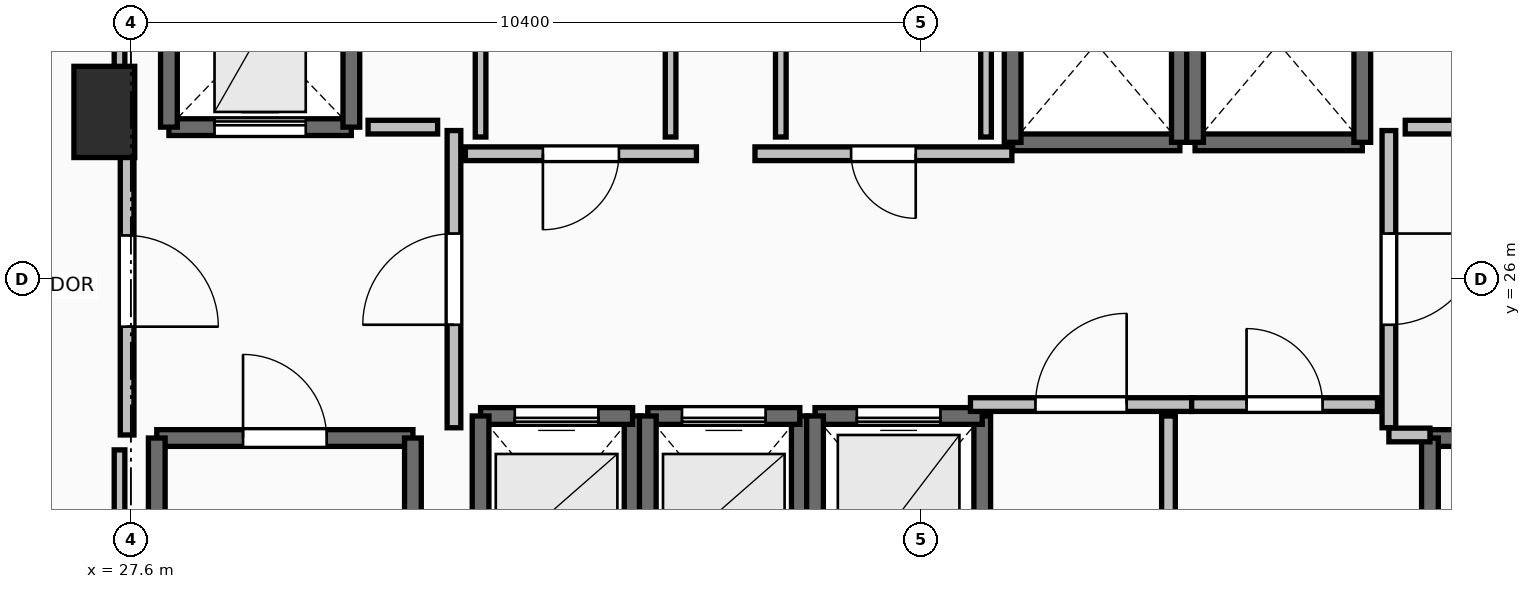
"""IFC4 building model, lengths in metres.
Left out: names, types, materials, properties, quantities, classifications, styles, units other than length and angle.
Written with IfcOpenShell. Run it as: python <this file> out.ifc"""

import sys

from ifc_helpers import new_model, si_unit, direction, frame, frame_2d, origin, origin_2d, place, context, subcontext, project, spatial, rectangle, extrude, element, fill, save


model = new_model("IFC4")
c1 = context("Model", 3, precision=1e-05, world=origin(), true_north=direction((0.0, 1.0)))
c2 = subcontext(c1, "Body", "Model", "MODEL_VIEW")
j1 = project(units=[si_unit("LENGTHUNIT", "METRE"), si_unit("PLANEANGLEUNIT", "RADIAN")], contexts=[c1])
p1 = place(None, origin())
s1 = spatial("IfcSite", under=j1, at=p1, CompositionType="ELEMENT")
p2 = place(p1, origin())
s2 = spatial("IfcBuilding", under=s1, at=p2, CompositionType="ELEMENT")
p3 = place(p2, frame((0.0, 0.0, 160.6)))
s3 = spatial("IfcBuildingStorey", under=s2, at=p3, CompositionType="ELEMENT", Elevation=160.6)
p4 = place(p3, frame((27.25, 28.2, 0.0), z_axis=(0.0, 0.0, 1.0), x_axis=(1.0, 0.0, 0.0)))
e1 = element("IfcColumn", 1, at=p4, inside=s3, PredefinedType="PILASTER", context=c2, shape_type="SweptSolid", body=[
    extrude(rectangle(XDim=0.8, YDim=1.2, at=origin_2d()), origin(), (0.0, 0.0, 1.0), 3.5),
])
p5 = place(p3, frame((27.94, 23.91, 0.0), z_axis=(0.0, 0.0, 1.0), x_axis=(1.0, 0.0, 0.0)))
e2 = element("IfcWall", 2, at=p5, inside=s3, PredefinedType="SOLIDWALL", context=c2, shape_type="SweptSolid", body=[
    extrude(rectangle(XDim=3.37, YDim=0.22, at=frame_2d((1.685, 0.0))), origin(), (0.0, 0.0, 1.0), 3.24),
])
p6 = place(p5, frame((1.135, 0.0, 0.0)))
e3 = element("IfcOpeningElement", 3, at=p6, cuts=e2, PredefinedType="OPENING", context=c2, shape_type="SweptSolid", body=[
    extrude(rectangle(XDim=1.1, YDim=2.15, at=frame_2d((0.55, 1.075))), frame((0.0, 0.125, 0.0), z_axis=(0.0, -1.0, 0.0), x_axis=(1.0, 0.0, 0.0)), (0.0, 0.0, 1.0), 0.25),
])
for number, where, z_axis, x_axis in (
    (4, (31.31, 23.91, 0.0), (0.0, 0.0, 1.0), (0.0, -1.0, 0.0)),
    (5, (27.94, 16.49, 0.0), (0.0, 0.0, 1.0), (0.0, 1.0, 0.0)),
):
    element("IfcWall", number, at=place(p3, frame(where, z_axis=z_axis, x_axis=x_axis)), inside=s3, PredefinedType="SOLIDWALL", context=c2, shape_type="SweptSolid", body=[
        extrude(rectangle(XDim=7.42, YDim=0.22, at=frame_2d((3.71, 0.0))), origin(), (0.0, 0.0, 1.0), 3.24),
    ])
p7 = place(p3, frame((44.69, 23.91, 0.0), z_axis=(0.0, 0.0, 1.0), x_axis=(1.0, 0.0, 0.0)))
e6 = element("IfcWall", 6, at=p7, inside=s3, PredefinedType="SOLIDWALL", context=c2, shape_type="SweptSolid", body=[
    extrude(rectangle(XDim=3.37, YDim=0.22, at=frame_2d((1.685, 0.0))), origin(), (0.0, 0.0, 1.0), 3.24),
])
p8 = place(p7, frame((1.135, 0.0, 0.0)))
e7 = element("IfcOpeningElement", 7, at=p8, cuts=e6, PredefinedType="OPENING", context=c2, shape_type="SweptSolid", body=[
    extrude(rectangle(XDim=1.1, YDim=2.15, at=frame_2d((0.55, 1.075))), frame((0.0, 0.125, 0.0), z_axis=(0.0, -1.0, 0.0), x_axis=(1.0, 0.0, 0.0)), (0.0, 0.0, 1.0), 0.25),
])
p9 = place(p3, frame((44.69, 16.49, 0.0), z_axis=(0.0, 0.0, 1.0), x_axis=(0.0, 1.0, 0.0)))
e8 = element("IfcWall", 8, at=p9, inside=s3, PredefinedType="SOLIDWALL", context=c2, shape_type="SweptSolid", body=[
    extrude(rectangle(XDim=7.42, YDim=0.22, at=frame_2d((3.71, 0.0))), origin(), (0.0, 0.0, 1.0), 3.24),
])
p10 = place(p3, frame((34.2, 21.8, 0.0), z_axis=(0.0, 0.0, 1.0), x_axis=(0.0, 1.0, 0.0)))
e9 = element("IfcWall", 9, at=p10, inside=s3, PredefinedType="SOLIDWALL", context=c2, shape_type="SweptSolid", body=[
    extrude(rectangle(XDim=2.4, YDim=0.22, at=frame_2d((1.2, 0.0))), origin(), (0.0, 0.0, 1.0), 3.24),
])
p11 = place(p3, frame((34.2, 24.2, 0.0), z_axis=(0.0, 0.0, 1.0), x_axis=(-1.0, 0.0, 0.0)))
e10 = element("IfcWall", 10, at=p11, inside=s3, PredefinedType="SOLIDWALL", context=c2, shape_type="SweptSolid", body=[
    extrude(rectangle(XDim=2.0, YDim=0.22, at=frame_2d((1.0, 0.0))), origin(), (0.0, 0.0, 1.0), 3.24),
])
p12 = place(p11, frame((0.45, 0.0, 0.0)))
e11 = element("IfcOpeningElement", 11, at=p12, cuts=e10, PredefinedType="OPENING", context=c2, shape_type="SweptSolid", body=[
    extrude(rectangle(XDim=1.1, YDim=2.2, at=frame_2d((0.55, 1.1))), frame((0.0, 0.125, 0.0), z_axis=(0.0, -1.0, 0.0), x_axis=(1.0, 0.0, 0.0)), (0.0, 0.0, 1.0), 0.25),
])
for number, where, z_axis, x_axis in (
    (12, (32.2, 24.2, 0.0), (0.0, 0.0, 1.0), (0.0, -1.0, 0.0)),
    (13, (36.4, 21.8, 0.0), (0.0, 0.0, 1.0), (0.0, 1.0, 0.0)),
):
    element("IfcWall", number, at=place(p3, frame(where, z_axis=z_axis, x_axis=x_axis)), inside=s3, PredefinedType="SOLIDWALL", context=c2, shape_type="SweptSolid", body=[
        extrude(rectangle(XDim=2.4, YDim=0.22, at=frame_2d((1.2, 0.0))), origin(), (0.0, 0.0, 1.0), 3.24),
    ])
p13 = place(p3, frame((36.4, 24.2, 0.0), z_axis=(0.0, 0.0, 1.0), x_axis=(-1.0, 0.0, 0.0)))
e14 = element("IfcWall", 14, at=p13, inside=s3, PredefinedType="SOLIDWALL", context=c2, shape_type="SweptSolid", body=[
    extrude(rectangle(XDim=2.0, YDim=0.22, at=frame_2d((1.0, 0.0))), origin(), (0.0, 0.0, 1.0), 3.24),
])
p14 = place(p13, frame((0.45, 0.0, 0.0)))
e15 = element("IfcOpeningElement", 15, at=p14, cuts=e14, PredefinedType="OPENING", context=c2, shape_type="SweptSolid", body=[
    extrude(rectangle(XDim=1.1, YDim=2.2, at=frame_2d((0.55, 1.1))), frame((0.0, 0.125, 0.0), z_axis=(0.0, -1.0, 0.0), x_axis=(1.0, 0.0, 0.0)), (0.0, 0.0, 1.0), 0.25),
])
p15 = place(p3, frame((34.4, 24.2, 0.0), z_axis=(0.0, 0.0, 1.0), x_axis=(0.0, -1.0, 0.0)))
e16 = element("IfcWall", 16, at=p15, inside=s3, PredefinedType="SOLIDWALL", context=c2, shape_type="SweptSolid", body=[
    extrude(rectangle(XDim=2.4, YDim=0.22, at=frame_2d((1.2, 0.0))), origin(), (0.0, 0.0, 1.0), 3.24),
])
p16 = place(p3, frame((38.8, 21.6, 0.0), z_axis=(0.0, 0.0, 1.0), x_axis=(0.0, 1.0, 0.0)))
e17 = element("IfcWall", 17, at=p16, inside=s3, PredefinedType="SOLIDWALL", context=c2, shape_type="SweptSolid", body=[
    extrude(rectangle(XDim=2.6, YDim=0.22, at=frame_2d((1.3, 0.0))), origin(), (0.0, 0.0, 1.0), 3.24),
])
p17 = place(p3, frame((38.8, 24.2, 0.0), z_axis=(0.0, 0.0, 1.0), x_axis=(-1.0, 0.0, 0.0)))
e18 = element("IfcWall", 18, at=p17, inside=s3, PredefinedType="SOLIDWALL", context=c2, shape_type="SweptSolid", body=[
    extrude(rectangle(XDim=2.2, YDim=0.22, at=frame_2d((1.1, 0.0))), origin(), (0.0, 0.0, 1.0), 3.24),
])
p18 = place(p17, frame((0.55, 0.0, 0.0)))
e19 = element("IfcOpeningElement", 19, at=p18, cuts=e18, PredefinedType="OPENING", context=c2, shape_type="SweptSolid", body=[
    extrude(rectangle(XDim=1.1, YDim=2.2, at=frame_2d((0.55, 1.1))), frame((0.0, 0.125, 0.0), z_axis=(0.0, -1.0, 0.0), x_axis=(1.0, 0.0, 0.0)), (0.0, 0.0, 1.0), 0.25),
])
p19 = place(p3, frame((36.6, 24.2, 0.0), z_axis=(0.0, 0.0, 1.0), x_axis=(0.0, -1.0, 0.0)))
e20 = element("IfcWall", 20, at=p19, inside=s3, PredefinedType="SOLIDWALL", context=c2, shape_type="SweptSolid", body=[
    extrude(rectangle(XDim=2.6, YDim=0.22, at=frame_2d((1.3, 0.0))), origin(), (0.0, 0.0, 1.0), 3.24),
])
p20 = place(p3, frame((39.2, 27.8, 0.0), z_axis=(0.0, 0.0, 1.0), x_axis=(1.0, 0.0, 0.0)))
e21 = element("IfcWall", 21, at=p20, inside=s3, PredefinedType="SOLIDWALL", context=c2, shape_type="SweptSolid", body=[
    extrude(rectangle(XDim=2.2, YDim=0.22, at=frame_2d((1.1, 0.0))), origin(), (0.0, 0.0, 1.0), 3.24),
])
for number, where, z_axis, x_axis in (
    (22, (41.4, 27.8, 0.0), (0.0, 0.0, 1.0), (0.0, 1.0, 0.0)),
    (23, (39.2, 30.4, 0.0), (0.0, 0.0, 1.0), (0.0, -1.0, 0.0)),
):
    element("IfcWall", number, at=place(p3, frame(where, z_axis=z_axis, x_axis=x_axis)), inside=s3, PredefinedType="SOLIDWALL", context=c2, shape_type="SweptSolid", body=[
        extrude(rectangle(XDim=2.6, YDim=0.22, at=frame_2d((1.3, 0.0))), origin(), (0.0, 0.0, 1.0), 3.24),
    ])
p21 = place(p3, frame((41.6, 27.8, 0.0), z_axis=(0.0, 0.0, 1.0), x_axis=(1.0, 0.0, 0.0)))
e24 = element("IfcWall", 24, at=p21, inside=s3, PredefinedType="SOLIDWALL", context=c2, shape_type="SweptSolid", body=[
    extrude(rectangle(XDim=2.2, YDim=0.22, at=frame_2d((1.1, 0.0))), origin(), (0.0, 0.0, 1.0), 3.24),
])
for number, where, z_axis, x_axis in (
    (25, (43.8, 27.8, 0.0), (0.0, 0.0, 1.0), (0.0, 1.0, 0.0)),
    (26, (41.6, 30.4, 0.0), (0.0, 0.0, 1.0), (0.0, -1.0, 0.0)),
):
    element("IfcWall", number, at=place(p3, frame(where, z_axis=z_axis, x_axis=x_axis)), inside=s3, PredefinedType="SOLIDWALL", context=c2, shape_type="SweptSolid", body=[
        extrude(rectangle(XDim=2.6, YDim=0.22, at=frame_2d((1.3, 0.0))), origin(), (0.0, 0.0, 1.0), 3.24),
    ])
p22 = place(p3, frame((28.1, 28.0, 0.0), z_axis=(0.0, 0.0, 1.0), x_axis=(1.0, 0.0, 0.0)))
e27 = element("IfcWall", 27, at=p22, inside=s3, PredefinedType="SHEAR", context=c2, shape_type="SweptSolid", body=[
    extrude(rectangle(XDim=2.4, YDim=0.22, at=frame_2d((1.2, 0.0))), origin(), (0.0, 0.0, 1.0), 3.24),
])
p23 = place(p22, frame((0.6, 0.0, 0.0)))
e28 = element("IfcOpeningElement", 28, at=p23, cuts=e27, PredefinedType="OPENING", context=c2, shape_type="SweptSolid", body=[
    extrude(rectangle(XDim=1.2, YDim=2.2, at=frame_2d((0.6, 1.1))), frame((0.0, 0.125, 0.0), z_axis=(0.0, -1.0, 0.0), x_axis=(1.0, 0.0, 0.0)), (0.0, 0.0, 1.0), 0.25),
])
for number, where, z_axis, x_axis in (
    (29, (30.5, 28.0, 0.0), (0.0, 0.0, 1.0), (0.0, 1.0, 0.0)),
    (30, (28.1, 30.5, 0.0), (0.0, 0.0, 1.0), (0.0, -1.0, 0.0)),
):
    element("IfcWall", number, at=place(p3, frame(where, z_axis=z_axis, x_axis=x_axis)), inside=s3, PredefinedType="SHEAR", context=c2, shape_type="SweptSolid", body=[
        extrude(rectangle(XDim=2.5, YDim=0.22, at=frame_2d((1.25, 0.0))), origin(), (0.0, 0.0, 1.0), 3.24),
    ])
p24 = place(p3, frame((31.85, 24.045, 0.0), z_axis=(0.0, 0.0, 1.0), x_axis=(0.0, 1.0, 0.0)))
e31 = element("IfcWall", 31, at=p24, inside=s3, PredefinedType="PARTITIONING", context=c2, shape_type="SweptSolid", body=[
    extrude(rectangle(XDim=3.91, YDim=0.18, at=frame_2d((1.955, 0.0))), origin(), (0.0, 0.0, 1.0), 3.24),
])
p25 = place(p24, frame((1.355, 0.0, 0.0)))
e32 = element("IfcOpeningElement", 32, at=p25, cuts=e31, PredefinedType="OPENING", context=c2, shape_type="SweptSolid", body=[
    extrude(rectangle(XDim=1.2, YDim=2.15, at=frame_2d((0.6, 1.075))), frame((0.0, 0.105, 0.0), z_axis=(0.0, -1.0, 0.0), x_axis=(1.0, 0.0, 0.0)), (0.0, 0.0, 1.0), 0.21),
])
p26 = place(p3, frame((27.55, 28.0, 0.0), z_axis=(0.0, 0.0, 1.0), x_axis=(0.0, -1.0, 0.0)))
e33 = element("IfcWall", 33, at=p26, inside=s3, PredefinedType="PARTITIONING", context=c2, shape_type="SweptSolid", body=[
    extrude(rectangle(XDim=4.05, YDim=0.18, at=frame_2d((2.025, 0.0))), origin(), (0.0, 0.0, 1.0), 3.24),
])
p27 = place(p26, frame((1.425, 0.0, 0.0)))
e34 = element("IfcOpeningElement", 34, at=p27, cuts=e33, PredefinedType="OPENING", context=c2, shape_type="SweptSolid", body=[
    extrude(rectangle(XDim=1.2, YDim=2.15, at=frame_2d((0.6, 1.075))), frame((0.0, 0.105, 0.0), z_axis=(0.0, -1.0, 0.0), x_axis=(1.0, 0.0, 0.0)), (0.0, 0.0, 1.0), 0.21),
])
p28 = place(p3, frame((44.15, 27.955, 0.0), z_axis=(0.0, 0.0, 1.0), x_axis=(0.0, -1.0, 0.0)))
e35 = element("IfcWall", 35, at=p28, inside=s3, PredefinedType="PARTITIONING", context=c2, shape_type="SweptSolid", body=[
    extrude(rectangle(XDim=3.91, YDim=0.18, at=frame_2d((1.955, 0.0))), origin(), (0.0, 0.0, 1.0), 3.24),
])
p29 = place(p28, frame((1.355, 0.0, 0.0)))
e36 = element("IfcOpeningElement", 36, at=p29, cuts=e35, PredefinedType="OPENING", context=c2, shape_type="SweptSolid", body=[
    extrude(rectangle(XDim=1.2, YDim=2.15, at=frame_2d((0.6, 1.075))), frame((0.0, 0.105, 0.0), z_axis=(0.0, -1.0, 0.0), x_axis=(1.0, 0.0, 0.0)), (0.0, 0.0, 1.0), 0.21),
])
p30 = place(p3, frame((44.15, 23.95, 0.0), z_axis=(0.0, 0.0, 1.0), x_axis=(1.0, 0.0, 0.0)))
e37 = element("IfcWall", 37, at=p30, inside=s3, PredefinedType="PARTITIONING", context=c2, shape_type="SweptSolid", body=[
    extrude(rectangle(XDim=0.54, YDim=0.18, at=frame_2d((0.27, 0.0))), origin(), (0.0, 0.0, 1.0), 3.24),
])
p31 = place(p3, frame((38.645, 24.35, 0.0), z_axis=(0.0, 0.0, 1.0), x_axis=(1.0, 0.0, 0.0)))
e38 = element("IfcWall", 38, at=p31, inside=s3, PredefinedType="PARTITIONING", context=c2, shape_type="SweptSolid", body=[
    extrude(rectangle(XDim=2.91, YDim=0.18, at=frame_2d((1.455, 0.0))), origin(), (0.0, 0.0, 1.0), 3.24),
])
p32 = place(p31, frame((0.855, 0.0, 0.0)))
e39 = element("IfcOpeningElement", 39, at=p32, cuts=e38, PredefinedType="OPENING", context=c2, shape_type="SweptSolid", body=[
    extrude(rectangle(XDim=1.2, YDim=2.15, at=frame_2d((0.6, 1.075))), frame((0.0, 0.105, 0.0), z_axis=(0.0, -1.0, 0.0), x_axis=(1.0, 0.0, 0.0)), (0.0, 0.0, 1.0), 0.21),
])
p33 = place(p3, frame((41.555, 24.35, 0.0), z_axis=(0.0, 0.0, 1.0), x_axis=(1.0, 0.0, 0.0)))
e40 = element("IfcWall", 40, at=p33, inside=s3, PredefinedType="PARTITIONING", context=c2, shape_type="SweptSolid", body=[
    extrude(rectangle(XDim=2.445, YDim=0.18, at=frame_2d((1.223, 0.0))), origin(), (0.0, 0.0, 1.0), 3.24),
])
p34 = place(p33, frame((0.722, 0.0, 0.0)))
e41 = element("IfcOpeningElement", 41, at=p34, cuts=e40, PredefinedType="OPENING", context=c2, shape_type="SweptSolid", body=[
    extrude(rectangle(XDim=1.0, YDim=2.15, at=frame_2d((0.5, 1.075))), frame((0.0, 0.105, 0.0), z_axis=(0.0, -1.0, 0.0), x_axis=(1.0, 0.0, 0.0)), (0.0, 0.0, 1.0), 0.21),
])
p35 = place(p3, frame((35.04, 27.65, 0.0), z_axis=(0.0, 0.0, 1.0), x_axis=(-1.0, 0.0, 0.0)))
e42 = element("IfcWall", 42, at=p35, inside=s3, PredefinedType="PARTITIONING", context=c2, shape_type="SweptSolid", body=[
    extrude(rectangle(XDim=3.04, YDim=0.18, at=frame_2d((1.52, 0.0))), origin(), (0.0, 0.0, 1.0), 3.24),
])
p36 = place(p35, frame((1.02, 0.0, 0.0)))
e43 = element("IfcOpeningElement", 43, at=p36, cuts=e42, PredefinedType="OPENING", context=c2, shape_type="SweptSolid", body=[
    extrude(rectangle(XDim=1.0, YDim=2.15, at=frame_2d((0.5, 1.075))), frame((0.0, 0.105, 0.0), z_axis=(0.0, -1.0, 0.0), x_axis=(1.0, 0.0, 0.0)), (0.0, 0.0, 1.0), 0.21),
])
p37 = place(p3, frame((39.19, 27.65, 0.0), z_axis=(0.0, 0.0, 1.0), x_axis=(-1.0, 0.0, 0.0)))
e44 = element("IfcWall", 44, at=p37, inside=s3, PredefinedType="PARTITIONING", context=c2, shape_type="SweptSolid", body=[
    extrude(rectangle(XDim=3.38, YDim=0.18, at=frame_2d((1.69, 0.0))), origin(), (0.0, 0.0, 1.0), 3.24),
])
p38 = place(p37, frame((1.265, 0.0, 0.0)))
e45 = element("IfcOpeningElement", 45, at=p38, cuts=e44, PredefinedType="OPENING", context=c2, shape_type="SweptSolid", body=[
    extrude(rectangle(XDim=0.85, YDim=2.1, at=frame_2d((0.425, 1.05))), frame((0.0, 0.105, 0.0), z_axis=(0.0, -1.0, 0.0), x_axis=(1.0, 0.0, 0.0)), (0.0, 0.0, 1.0), 0.21),
])
p39 = place(p3, frame((41.25, 20.305, 0.0), z_axis=(0.0, 0.0, 1.0), x_axis=(0.0, 1.0, 0.0)))
e46 = element("IfcWall", 46, at=p39, inside=s3, PredefinedType="PARTITIONING", context=c2, shape_type="SweptSolid", body=[
    extrude(rectangle(XDim=3.895, YDim=0.18, at=frame_2d((1.948, 0.0))), origin(), (0.0, 0.0, 1.0), 3.24),
])
p40 = place(p39, frame((1.448, 0.0, 0.0)))
e47 = element("IfcOpeningElement", 47, at=p40, cuts=e46, PredefinedType="OPENING", context=c2, shape_type="SweptSolid", body=[
    extrude(rectangle(XDim=1.0, YDim=2.15, at=frame_2d((0.5, 1.075))), frame((0.0, 0.105, 0.0), z_axis=(0.0, -1.0, 0.0), x_axis=(1.0, 0.0, 0.0)), (0.0, 0.0, 1.0), 0.21),
])
for number, where, z_axis, x_axis in (
    (48, (31.635, 28.0, 0.0), (0.0, 0.0, 1.0), (-1.0, 0.0, 0.0)),
    (49, (45.28, 28.0, 0.0), (0.0, 0.0, 1.0), (-1.0, 0.0, 0.0)),
):
    element("IfcWall", number, at=place(p3, frame(where, z_axis=z_axis, x_axis=x_axis)), inside=s3, PredefinedType="PARTITIONING", context=c2, shape_type="SweptSolid", body=[
        extrude(rectangle(XDim=0.915, YDim=0.18, at=frame_2d((0.458, 0.0))), origin(), (0.0, 0.0, 1.0), 3.24),
    ])
for number, where, z_axis, x_axis in (
    (50, (32.2, 30.26, 0.0), (0.0, 0.0, 1.0), (0.0, -1.0, 0.0)),
    (51, (34.7, 27.87, 0.0), (0.0, 0.0, 1.0), (0.0, 1.0, 0.0)),
    (52, (36.15, 30.26, 0.0), (0.0, 0.0, 1.0), (0.0, -1.0, 0.0)),
    (53, (38.85, 27.87, 0.0), (0.0, 0.0, 1.0), (0.0, 1.0, 0.0)),
):
    element("IfcWall", number, at=place(p3, frame(where, z_axis=z_axis, x_axis=x_axis)), inside=s3, PredefinedType="PARTITIONING", context=c2, shape_type="SweptSolid", body=[
        extrude(rectangle(XDim=2.39, YDim=0.14, at=frame_2d((1.195, 0.0))), origin(), (0.0, 0.0, 1.0), 3.24),
    ])
p41 = place(p3, frame((27.45, 33.45, 0.0), z_axis=(0.0, 0.0, 1.0), x_axis=(0.0, -1.0, 0.0)))
e54 = element("IfcWall", 54, at=p41, inside=s3, PredefinedType="PARTITIONING", context=c2, shape_type="SweptSolid", body=[
    extrude(rectangle(XDim=5.254, YDim=0.14, at=frame_2d((2.627, 0.0))), origin(), (0.0, 0.0, 1.0), 2.432),
])
p42 = place(p3, frame((27.45, 23.754, 0.0), z_axis=(0.0, 0.0, 1.0), x_axis=(0.0, -1.0, 0.0)))
e55 = element("IfcWall", 55, at=p42, inside=s3, PredefinedType="PARTITIONING", context=c2, shape_type="SweptSolid", body=[
    extrude(rectangle(XDim=7.514, YDim=0.14, at=frame_2d((3.757, 0.0))), origin(), (0.0, 0.0, 1.0), 2.432),
])
p43 = place(p6, origin())
e56 = element("IfcDoor", 56, at=p43, inside=s3, OperationType="SINGLE_SWING_LEFT", PredefinedType="DOOR", context=c2, shape_type="SweptSolid", body=[
    extrude(rectangle(XDim=1.1, YDim=2.15, at=frame_2d((0.55, 1.075))), frame((0.0, 0.025, 0.0), z_axis=(0.0, -1.0, 0.0), x_axis=(1.0, 0.0, 0.0)), (0.0, 0.0, 1.0), 0.05),
])
fill(e3, e56)
p44 = place(p12, origin())
e57 = element("IfcDoor", 57, at=p44, inside=s3, OperationType="SLIDING_TO_LEFT", PredefinedType="DOOR", context=c2, shape_type="SweptSolid", body=[
    extrude(rectangle(XDim=1.1, YDim=2.2, at=frame_2d((0.55, 1.1))), frame((0.0, 0.025, 0.0), z_axis=(0.0, -1.0, 0.0), x_axis=(1.0, 0.0, 0.0)), (0.0, 0.0, 1.0), 0.05),
])
fill(e11, e57)
p45 = place(p14, origin())
e58 = element("IfcDoor", 58, at=p45, inside=s3, OperationType="SLIDING_TO_LEFT", PredefinedType="DOOR", context=c2, shape_type="SweptSolid", body=[
    extrude(rectangle(XDim=1.1, YDim=2.2, at=frame_2d((0.55, 1.1))), frame((0.0, 0.025, 0.0), z_axis=(0.0, -1.0, 0.0), x_axis=(1.0, 0.0, 0.0)), (0.0, 0.0, 1.0), 0.05),
])
fill(e15, e58)
p46 = place(p18, origin())
e59 = element("IfcDoor", 59, at=p46, inside=s3, OperationType="SLIDING_TO_LEFT", PredefinedType="DOOR", context=c2, shape_type="SweptSolid", body=[
    extrude(rectangle(XDim=1.1, YDim=2.2, at=frame_2d((0.55, 1.1))), frame((0.0, 0.025, 0.0), z_axis=(0.0, -1.0, 0.0), x_axis=(1.0, 0.0, 0.0)), (0.0, 0.0, 1.0), 0.05),
])
fill(e19, e59)
p47 = place(p23, origin())
e60 = element("IfcDoor", 60, at=p47, inside=s3, OperationType="SLIDING_TO_LEFT", PredefinedType="DOOR", context=c2, shape_type="SweptSolid", body=[
    extrude(rectangle(XDim=1.2, YDim=2.2, at=frame_2d((0.6, 1.1))), frame((0.0, 0.025, 0.0), z_axis=(0.0, -1.0, 0.0), x_axis=(1.0, 0.0, 0.0)), (0.0, 0.0, 1.0), 0.05),
])
fill(e28, e60)
p48 = place(p25, origin())
e61 = element("IfcDoor", 61, at=p48, inside=s3, OperationType="SINGLE_SWING_LEFT", PredefinedType="DOOR", context=c2, shape_type="SweptSolid", body=[
    extrude(rectangle(XDim=1.2, YDim=2.15, at=frame_2d((0.6, 1.075))), frame((0.0, 0.025, 0.0), z_axis=(0.0, -1.0, 0.0), x_axis=(1.0, 0.0, 0.0)), (0.0, 0.0, 1.0), 0.05),
])
fill(e32, e61)
p49 = place(p27, origin())
e62 = element("IfcDoor", 62, at=p49, inside=s3, OperationType="SINGLE_SWING_RIGHT", PredefinedType="DOOR", context=c2, shape_type="SweptSolid", body=[
    extrude(rectangle(XDim=1.2, YDim=2.15, at=frame_2d((0.6, 1.075))), frame((0.0, 0.025, 0.0), z_axis=(0.0, -1.0, 0.0), x_axis=(1.0, 0.0, 0.0)), (0.0, 0.0, 1.0), 0.05),
])
fill(e34, e62)
p50 = place(p29, origin())
e63 = element("IfcDoor", 63, at=p50, inside=s3, OperationType="SINGLE_SWING_LEFT", PredefinedType="DOOR", context=c2, shape_type="SweptSolid", body=[
    extrude(rectangle(XDim=1.2, YDim=2.15, at=frame_2d((0.6, 1.075))), frame((0.0, 0.025, 0.0), z_axis=(0.0, -1.0, 0.0), x_axis=(1.0, 0.0, 0.0)), (0.0, 0.0, 1.0), 0.05),
])
fill(e36, e63)
p51 = place(p32, origin())
e64 = element("IfcDoor", 64, at=p51, inside=s3, OperationType="SINGLE_SWING_RIGHT", PredefinedType="DOOR", context=c2, shape_type="SweptSolid", body=[
    extrude(rectangle(XDim=1.2, YDim=2.15, at=frame_2d((0.6, 1.075))), frame((0.0, 0.025, 0.0), z_axis=(0.0, -1.0, 0.0), x_axis=(1.0, 0.0, 0.0)), (0.0, 0.0, 1.0), 0.05),
])
fill(e39, e64)
p52 = place(p34, origin())
e65 = element("IfcDoor", 65, at=p52, inside=s3, OperationType="SINGLE_SWING_LEFT", PredefinedType="DOOR", context=c2, shape_type="SweptSolid", body=[
    extrude(rectangle(XDim=1.0, YDim=2.15, at=frame_2d((0.5, 1.075))), frame((0.0, 0.025, 0.0), z_axis=(0.0, -1.0, 0.0), x_axis=(1.0, 0.0, 0.0)), (0.0, 0.0, 1.0), 0.05),
])
fill(e41, e65)
p53 = place(p36, origin())
e66 = element("IfcDoor", 66, at=p53, inside=s3, OperationType="SINGLE_SWING_RIGHT", PredefinedType="DOOR", context=c2, shape_type="SweptSolid", body=[
    extrude(rectangle(XDim=1.0, YDim=2.15, at=frame_2d((0.5, 1.075))), frame((0.0, 0.025, 0.0), z_axis=(0.0, -1.0, 0.0), x_axis=(1.0, 0.0, 0.0)), (0.0, 0.0, 1.0), 0.05),
])
fill(e43, e66)
p54 = place(p38, origin())
e67 = element("IfcDoor", 67, at=p54, inside=s3, OperationType="SINGLE_SWING_LEFT", PredefinedType="DOOR", context=c2, shape_type="SweptSolid", body=[
    extrude(rectangle(XDim=0.85, YDim=2.1, at=frame_2d((0.425, 1.05))), frame((0.0, 0.025, 0.0), z_axis=(0.0, -1.0, 0.0), x_axis=(1.0, 0.0, 0.0)), (0.0, 0.0, 1.0), 0.05),
])
fill(e45, e67)
save(model, sys.argv[1])
